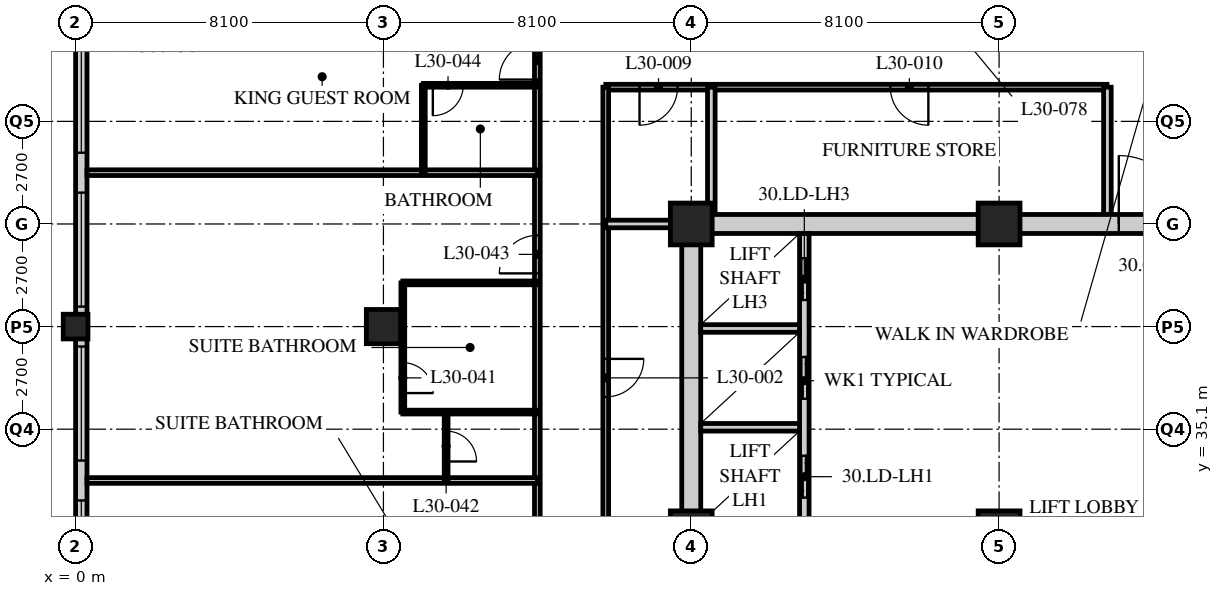
"""IFC4 building model, lengths in metres.
Left out: names, types, materials, properties, quantities, classifications, styles, units other than length and angle.
Written with IfcOpenShell. Run it as: python <this file> out.ifc"""

import sys

from ifc_helpers import new_model, si_unit, direction, frame, frame_2d, origin, origin_2d, place, context, subcontext, project, spatial, rectangle, hollow_rectangle, extrude, element, fill, save


model = new_model("IFC4")
c1 = context("Model", 3, precision=1e-05, world=origin(), true_north=direction((0.0, 1.0)))
c2 = subcontext(c1, "Body", "Model", "MODEL_VIEW")
j1 = project(units=[si_unit("LENGTHUNIT", "METRE"), si_unit("PLANEANGLEUNIT", "RADIAN")], contexts=[c1])
p1 = place(None, origin())
s1 = spatial("IfcSite", under=j1, at=p1, CompositionType="ELEMENT")
p2 = place(p1, origin())
s2 = spatial("IfcBuilding", under=s1, at=p2, CompositionType="ELEMENT")
p3 = place(p2, frame((0.0, 0.0, 120.4)))
s3 = spatial("IfcBuildingStorey", under=s2, at=p3, CompositionType="ELEMENT", Elevation=120.4)
p4 = place(p3, frame((0.0, 37.8, 0.0), z_axis=(0.0, 0.0, 1.0), x_axis=(1.0, 0.0, 0.0)))
e1 = element("IfcColumn", 1, at=p4, inside=s3, PredefinedType="COLUMN", context=c2, shape_type="SweptSolid", body=[
    extrude(hollow_rectangle(XDim=0.65, YDim=0.65, WallThickness=0.055, at=origin_2d()), origin(), (0.0, 0.0, 1.0), 3.4),
])
p5 = place(p3, frame((8.1, 37.8, 0.0), z_axis=(0.0, 0.0, 1.0), x_axis=(1.0, 0.0, 0.0)))
e2 = element("IfcColumn", 2, at=p5, inside=s3, PredefinedType="COLUMN", context=c2, shape_type="SweptSolid", body=[
    extrude(hollow_rectangle(XDim=0.9, YDim=0.9, WallThickness=0.09, at=origin_2d()), origin(), (0.0, 0.0, 1.0), 3.4),
])
for number, where, z_axis, x_axis in (
    (3, (16.2, 32.4, 0.0), (0.0, 0.0, 1.0), (1.0, 0.0, 0.0)),
    (4, (16.2, 40.5, 0.0), (0.0, 0.0, 1.0), (1.0, 0.0, 0.0)),
    (5, (24.3, 32.4, 0.0), (0.0, 0.0, 1.0), (1.0, 0.0, 0.0)),
    (6, (24.3, 40.5, 0.0), (0.0, 0.0, 1.0), (1.0, 0.0, 0.0)),
):
    element("IfcColumn", number, at=place(p3, frame(where, z_axis=z_axis, x_axis=x_axis)), inside=s3, PredefinedType="COLUMN", context=c2, shape_type="SweptSolid", body=[
        extrude(hollow_rectangle(XDim=1.1, YDim=1.1, WallThickness=0.1, at=origin_2d()), origin(), (0.0, 0.0, 1.0), 3.4),
    ])
p6 = place(p3, frame((0.15, 45.6, 0.0), z_axis=(0.0, 0.0, 1.0), x_axis=(0.0, -1.0, 0.0)))
e7 = element("IfcWall", 7, at=p6, inside=s3, PredefinedType="SOLIDWALL", context=c2, shape_type="SweptSolid", body=[
    extrude(rectangle(XDim=32.1, YDim=0.3, at=frame_2d((16.05, 0.0))), origin(), (0.0, 0.0, 1.0), 3.19),
])
p7 = place(p6, frame((0.225, 0.0, 0.9)))
e8 = element("IfcOpeningElement", 8, at=p7, cuts=e7, PredefinedType="OPENING", context=c2, shape_type="SweptSolid", body=[
    extrude(rectangle(XDim=3.0, YDim=2.0, at=frame_2d((1.5, 1.0))), frame((0.0, 0.16, 0.0), z_axis=(0.0, -1.0, 0.0), x_axis=(1.0, 0.0, 0.0)), (0.0, 0.0, 1.0), 0.32),
])
p8 = place(p6, frame((4.275, 0.0, 0.9)))
e9 = element("IfcOpeningElement", 9, at=p8, cuts=e7, PredefinedType="OPENING", context=c2, shape_type="SweptSolid", body=[
    extrude(rectangle(XDim=3.0, YDim=2.0, at=frame_2d((1.5, 1.0))), frame((0.0, 0.16, 0.0), z_axis=(0.0, -1.0, 0.0), x_axis=(1.0, 0.0, 0.0)), (0.0, 0.0, 1.0), 0.32),
])
p9 = place(p6, frame((8.325, 0.0, 0.9)))
e10 = element("IfcOpeningElement", 10, at=p9, cuts=e7, PredefinedType="OPENING", context=c2, shape_type="SweptSolid", body=[
    extrude(rectangle(XDim=3.0, YDim=2.0, at=frame_2d((1.5, 1.0))), frame((0.0, 0.16, 0.0), z_axis=(0.0, -1.0, 0.0), x_axis=(1.0, 0.0, 0.0)), (0.0, 0.0, 1.0), 0.32),
])
p10 = place(p6, frame((12.375, 0.0, 0.9)))
e11 = element("IfcOpeningElement", 11, at=p10, cuts=e7, PredefinedType="OPENING", context=c2, shape_type="SweptSolid", body=[
    extrude(rectangle(XDim=3.0, YDim=2.0, at=frame_2d((1.5, 1.0))), frame((0.0, 0.16, 0.0), z_axis=(0.0, -1.0, 0.0), x_axis=(1.0, 0.0, 0.0)), (0.0, 0.0, 1.0), 0.32),
])
p11 = place(p6, frame((16.425, 0.0, 0.9)))
e12 = element("IfcOpeningElement", 12, at=p11, cuts=e7, PredefinedType="OPENING", context=c2, shape_type="SweptSolid", body=[
    extrude(rectangle(XDim=3.0, YDim=2.0, at=frame_2d((1.5, 1.0))), frame((0.0, 0.16, 0.0), z_axis=(0.0, -1.0, 0.0), x_axis=(1.0, 0.0, 0.0)), (0.0, 0.0, 1.0), 0.32),
])
p12 = place(p6, frame((20.475, 0.0, 0.9)))
e13 = element("IfcOpeningElement", 13, at=p12, cuts=e7, PredefinedType="OPENING", context=c2, shape_type="SweptSolid", body=[
    extrude(rectangle(XDim=3.0, YDim=2.0, at=frame_2d((1.5, 1.0))), frame((0.0, 0.16, 0.0), z_axis=(0.0, -1.0, 0.0), x_axis=(1.0, 0.0, 0.0)), (0.0, 0.0, 1.0), 0.32),
])
p13 = place(p6, frame((24.525, 0.0, 0.9)))
e14 = element("IfcOpeningElement", 14, at=p13, cuts=e7, PredefinedType="OPENING", context=c2, shape_type="SweptSolid", body=[
    extrude(rectangle(XDim=3.0, YDim=2.0, at=frame_2d((1.5, 1.0))), frame((0.0, 0.16, 0.0), z_axis=(0.0, -1.0, 0.0), x_axis=(1.0, 0.0, 0.0)), (0.0, 0.0, 1.0), 0.32),
])
p14 = place(p6, frame((28.575, 0.0, 0.9)))
e15 = element("IfcOpeningElement", 15, at=p14, cuts=e7, PredefinedType="OPENING", context=c2, shape_type="SweptSolid", body=[
    extrude(rectangle(XDim=3.0, YDim=2.0, at=frame_2d((1.5, 1.0))), frame((0.0, 0.16, 0.0), z_axis=(0.0, -1.0, 0.0), x_axis=(1.0, 0.0, 0.0)), (0.0, 0.0, 1.0), 0.32),
])
p15 = place(p3, frame((12.15, 17.55, 0.0), z_axis=(0.0, 0.0, 1.0), x_axis=(0.0, 1.0, 0.0)))
e16 = element("IfcWall", 16, at=p15, inside=s3, PredefinedType="PARTITIONING", context=c2, shape_type="SweptSolid", body=[
    extrude(rectangle(XDim=28.35, YDim=0.15, at=frame_2d((14.175, 0.0))), origin(), (0.0, 0.0, 1.0), 3.19),
])
p16 = place(p15, frame((5.45, 0.0, 0.0)))
e17 = element("IfcOpeningElement", 17, at=p16, cuts=e16, PredefinedType="OPENING", context=c2, shape_type="SweptSolid", body=[
    extrude(rectangle(XDim=1.0, YDim=2.1, at=frame_2d((0.5, 1.05))), frame((0.0, 0.085, 0.0), z_axis=(0.0, -1.0, 0.0), x_axis=(1.0, 0.0, 0.0)), (0.0, 0.0, 1.0), 0.17),
])
p17 = place(p15, frame((13.55, 0.0, 0.0)))
e18 = element("IfcOpeningElement", 18, at=p17, cuts=e16, PredefinedType="OPENING", context=c2, shape_type="SweptSolid", body=[
    extrude(rectangle(XDim=1.0, YDim=2.1, at=frame_2d((0.5, 1.05))), frame((0.0, 0.085, 0.0), z_axis=(0.0, -1.0, 0.0), x_axis=(1.0, 0.0, 0.0)), (0.0, 0.0, 1.0), 0.17),
])
p18 = place(p15, frame((21.65, 0.0, 0.0)))
e19 = element("IfcOpeningElement", 19, at=p18, cuts=e16, PredefinedType="OPENING", context=c2, shape_type="SweptSolid", body=[
    extrude(rectangle(XDim=1.0, YDim=2.1, at=frame_2d((0.5, 1.05))), frame((0.0, 0.085, 0.0), z_axis=(0.0, -1.0, 0.0), x_axis=(1.0, 0.0, 0.0)), (0.0, 0.0, 1.0), 0.17),
])
p19 = place(p15, frame((26.75, 0.0, 0.0)))
e20 = element("IfcOpeningElement", 20, at=p19, cuts=e16, PredefinedType="OPENING", context=c2, shape_type="SweptSolid", body=[
    extrude(rectangle(XDim=1.0, YDim=2.1, at=frame_2d((0.5, 1.05))), frame((0.0, 0.085, 0.0), z_axis=(0.0, -1.0, 0.0), x_axis=(1.0, 0.0, 0.0)), (0.0, 0.0, 1.0), 0.17),
])
p20 = place(p3, frame((27.14, 44.1, 0.0), z_axis=(0.0, 0.0, 1.0), x_axis=(-1.0, 0.0, 0.0)))
e21 = element("IfcWall", 21, at=p20, inside=s3, PredefinedType="PARTITIONING", context=c2, shape_type="SweptSolid", body=[
    extrude(rectangle(XDim=13.19, YDim=0.15, at=frame_2d((6.595, 0.0))), origin(), (0.0, 0.0, 1.0), 3.19),
])
p21 = place(p20, frame((11.301, 0.0, 0.0)))
e22 = element("IfcOpeningElement", 22, at=p21, cuts=e21, PredefinedType="OPENING", context=c2, shape_type="SweptSolid", body=[
    extrude(rectangle(XDim=1.0, YDim=2.1, at=frame_2d((0.5, 1.05))), frame((0.0, 0.085, 0.0), z_axis=(0.0, -1.0, 0.0), x_axis=(1.0, 0.0, 0.0)), (0.0, 0.0, 1.0), 0.17),
])
p22 = place(p20, frame((4.701, 0.0, 0.0)))
e23 = element("IfcOpeningElement", 23, at=p22, cuts=e21, PredefinedType="OPENING", context=c2, shape_type="SweptSolid", body=[
    extrude(rectangle(XDim=1.0, YDim=2.1, at=frame_2d((0.5, 1.05))), frame((0.0, 0.085, 0.0), z_axis=(0.0, -1.0, 0.0), x_axis=(1.0, 0.0, 0.0)), (0.0, 0.0, 1.0), 0.17),
])
p23 = place(p3, frame((13.95, 44.1, 0.0), z_axis=(0.0, 0.0, 1.0), x_axis=(0.0, -1.0, 0.0)))
e24 = element("IfcWall", 24, at=p23, inside=s3, PredefinedType="PARTITIONING", context=c2, shape_type="SweptSolid", body=[
    extrude(rectangle(XDim=24.75, YDim=0.15, at=frame_2d((12.375, 0.0))), origin(), (0.0, 0.0, 1.0), 3.19),
])
p24 = place(p23, frame((15.25, 0.0, 0.0)))
e25 = element("IfcOpeningElement", 25, at=p24, cuts=e24, PredefinedType="OPENING", context=c2, shape_type="SweptSolid", body=[
    extrude(rectangle(XDim=1.0, YDim=2.1, at=frame_2d((0.5, 1.05))), frame((0.0, 0.085, 0.0), z_axis=(0.0, -1.0, 0.0), x_axis=(1.0, 0.0, 0.0)), (0.0, 0.0, 1.0), 0.17),
])
p25 = place(p23, frame((7.15, 0.0, 0.0)))
e26 = element("IfcOpeningElement", 26, at=p25, cuts=e24, PredefinedType="OPENING", context=c2, shape_type="SweptSolid", body=[
    extrude(rectangle(XDim=1.0, YDim=2.1, at=frame_2d((0.5, 1.05))), frame((0.0, 0.085, 0.0), z_axis=(0.0, -1.0, 0.0), x_axis=(1.0, 0.0, 0.0)), (0.0, 0.0, 1.0), 0.17),
])
for number, where, z_axis, x_axis in (
    (27, (16.728, 44.1, 0.0), (0.0, 0.0, 1.0), (0.0, -1.0, 0.0)),
    (28, (27.15, 40.5, 0.0), (0.0, 0.0, 1.0), (0.0, 1.0, 0.0)),
):
    element("IfcWall", number, at=place(p3, frame(where, z_axis=z_axis, x_axis=x_axis)), inside=s3, PredefinedType="SOLIDWALL", context=c2, shape_type="SweptSolid", body=[
        extrude(rectangle(XDim=3.6, YDim=0.2, at=frame_2d((1.8, 0.0))), origin(), (0.0, 0.0, 1.0), 3.19),
    ])
p26 = place(p3, frame((13.95, 40.5, 0.0), z_axis=(0.0, 0.0, 1.0), x_axis=(1.0, 0.0, 0.0)))
e29 = element("IfcWall", 29, at=p26, inside=s3, PredefinedType="SOLIDWALL", context=c2, shape_type="SweptSolid", body=[
    extrude(rectangle(XDim=2.25, YDim=0.2, at=frame_2d((1.125, 0.0))), origin(), (0.0, 0.0, 1.0), 3.19),
])
p27 = place(p3, frame((12.15, 33.75, 0.0), z_axis=(0.0, 0.0, 1.0), x_axis=(-1.0, 0.0, 0.0)))
e30 = element("IfcWall", 30, at=p27, inside=s3, PredefinedType="PARTITIONING", context=c2, shape_type="SweptSolid", body=[
    extrude(rectangle(XDim=11.85, YDim=0.15, at=frame_2d((5.925, 0.0))), origin(), (0.0, 0.0, 1.0), 3.19),
])
p28 = place(p3, frame((8.61, 35.55, 0.0), z_axis=(0.0, 0.0, 1.0), x_axis=(0.0, 1.0, 0.0)))
e31 = element("IfcWall", 31, at=p28, inside=s3, PredefinedType="PARTITIONING", context=c2, shape_type="SweptSolid", body=[
    extrude(rectangle(XDim=3.4, YDim=0.1, at=frame_2d((1.7, 0.0))), origin(), (0.0, 0.0, 1.0), 3.19),
])
p29 = place(p28, frame((0.5, 0.0, 0.0)))
e32 = element("IfcOpeningElement", 32, at=p29, cuts=e31, PredefinedType="OPENING", context=c2, shape_type="SweptSolid", body=[
    extrude(rectangle(XDim=0.8, YDim=2.1, at=frame_2d((0.4, 1.05))), frame((0.0, 0.06, 0.0), z_axis=(0.0, -1.0, 0.0), x_axis=(1.0, 0.0, 0.0)), (0.0, 0.0, 1.0), 0.12),
])
p30 = place(p3, frame((9.75, 33.75, 0.0), z_axis=(0.0, 0.0, 1.0), x_axis=(0.0, 1.0, 0.0)))
e33 = element("IfcWall", 33, at=p30, inside=s3, PredefinedType="PARTITIONING", context=c2, shape_type="SweptSolid", body=[
    extrude(rectangle(XDim=1.8, YDim=0.1, at=frame_2d((0.9, 0.0))), origin(), (0.0, 0.0, 1.0), 3.19),
])
p31 = place(p30, frame((0.5, 0.0, 0.0)))
e34 = element("IfcOpeningElement", 34, at=p31, cuts=e33, PredefinedType="OPENING", context=c2, shape_type="SweptSolid", body=[
    extrude(rectangle(XDim=0.8, YDim=2.1, at=frame_2d((0.4, 1.05))), frame((0.0, 0.06, 0.0), z_axis=(0.0, -1.0, 0.0), x_axis=(1.0, 0.0, 0.0)), (0.0, 0.0, 1.0), 0.12),
])
for number, where, z_axis, x_axis in (
    (35, (12.15, 35.55, 0.0), (0.0, 0.0, 1.0), (-1.0, 0.0, 0.0)),
    (36, (12.15, 38.95, 0.0), (0.0, 0.0, 1.0), (-1.0, 0.0, 0.0)),
):
    element("IfcWall", number, at=place(p3, frame(where, z_axis=z_axis, x_axis=x_axis)), inside=s3, PredefinedType="PARTITIONING", context=c2, shape_type="SweptSolid", body=[
        extrude(rectangle(XDim=3.54, YDim=0.1, at=frame_2d((1.77, 0.0))), origin(), (0.0, 0.0, 1.0), 3.19),
    ])
p32 = place(p3, frame((12.15, 41.85, 0.0), z_axis=(0.0, 0.0, 1.0), x_axis=(-1.0, 0.0, 0.0)))
e37 = element("IfcWall", 37, at=p32, inside=s3, PredefinedType="PARTITIONING", context=c2, shape_type="SweptSolid", body=[
    extrude(rectangle(XDim=11.85, YDim=0.15, at=frame_2d((5.925, 0.0))), origin(), (0.0, 0.0, 1.0), 3.19),
])
p33 = place(p3, frame((9.15, 41.85, 0.0), z_axis=(0.0, 0.0, 1.0), x_axis=(0.0, 1.0, 0.0)))
e38 = element("IfcWall", 38, at=p33, inside=s3, PredefinedType="PARTITIONING", context=c2, shape_type="SweptSolid", body=[
    extrude(rectangle(XDim=2.3, YDim=0.1, at=frame_2d((1.15, 0.0))), origin(), (0.0, 0.0, 1.0), 3.19),
])
p34 = place(p3, frame((12.15, 44.15, 0.0), z_axis=(0.0, 0.0, 1.0), x_axis=(-1.0, 0.0, 0.0)))
e39 = element("IfcWall", 39, at=p34, inside=s3, PredefinedType="PARTITIONING", context=c2, shape_type="SweptSolid", body=[
    extrude(rectangle(XDim=3.0, YDim=0.1, at=frame_2d((1.5, 0.0))), origin(), (0.0, 0.0, 1.0), 3.19),
])
p35 = place(p34, frame((1.95, 0.0, 0.0)))
e40 = element("IfcOpeningElement", 40, at=p35, cuts=e39, PredefinedType="OPENING", context=c2, shape_type="SweptSolid", body=[
    extrude(rectangle(XDim=0.8, YDim=2.1, at=frame_2d((0.4, 1.05))), frame((0.0, 0.06, 0.0), z_axis=(0.0, -1.0, 0.0), x_axis=(1.0, 0.0, 0.0)), (0.0, 0.0, 1.0), 0.12),
])
p36 = place(p3, frame((15.95, 40.5, 0.0), z_axis=(0.0, 0.0, 1.0), x_axis=(1.0, 0.0, 0.0)))
e41 = element("IfcWall", 41, at=p36, inside=s3, PredefinedType="SOLIDWALL", context=c2, shape_type="SweptSolid", body=[
    extrude(rectangle(XDim=24.8, YDim=0.5, at=frame_2d((12.4, 0.0))), origin(), (0.0, 0.0, 1.0), 2.54),
])
p37 = place(p36, frame((11.5, 0.0, 0.0)))
e42 = element("IfcOpeningElement", 42, at=p37, cuts=e41, PredefinedType="OPENING", context=c2, shape_type="SweptSolid", body=[
    extrude(rectangle(XDim=1.8, YDim=2.4, at=frame_2d((0.9, 1.2))), frame((0.0, 0.26, 0.0), z_axis=(0.0, -1.0, 0.0), x_axis=(1.0, 0.0, 0.0)), (0.0, 0.0, 1.0), 0.52),
])
p38 = place(p3, frame((16.2, 24.55, 0.0), z_axis=(0.0, 0.0, 1.0), x_axis=(0.0, 1.0, 0.0)))
e43 = element("IfcWall", 43, at=p38, inside=s3, PredefinedType="SOLIDWALL", context=c2, shape_type="SweptSolid", body=[
    extrude(rectangle(XDim=15.7, YDim=0.5, at=frame_2d((7.85, 0.0))), origin(), (0.0, 0.0, 1.0), 2.578),
])
p39 = place(p3, frame((19.175, 32.5, 0.0), z_axis=(0.0, 0.0, 1.0), x_axis=(0.0, 1.0, 0.0)))
e44 = element("IfcWall", 44, at=p39, inside=s3, PredefinedType="SOLIDWALL", context=c2, shape_type="SweptSolid", body=[
    extrude(rectangle(XDim=7.75, YDim=0.25, at=frame_2d((3.875, 0.0))), origin(), (0.0, 0.0, 1.0), 3.19),
])
p40 = place(p39, frame((0.8, 0.0, 0.0)))
e45 = element("IfcOpeningElement", 45, at=p40, cuts=e44, PredefinedType="OPENING", context=c2, shape_type="SweptSolid", body=[
    extrude(rectangle(XDim=1.1, YDim=2.4, at=frame_2d((0.55, 1.2))), frame((0.0, 0.135, 0.0), z_axis=(0.0, -1.0, 0.0), x_axis=(1.0, 0.0, 0.0)), (0.0, 0.0, 1.0), 0.27),
])
p41 = place(p39, frame((3.4, 0.0, 0.0)))
e46 = element("IfcOpeningElement", 46, at=p41, cuts=e44, PredefinedType="OPENING", context=c2, shape_type="SweptSolid", body=[
    extrude(rectangle(XDim=1.1, YDim=2.4, at=frame_2d((0.55, 1.2))), frame((0.0, 0.135, 0.0), z_axis=(0.0, -1.0, 0.0), x_axis=(1.0, 0.0, 0.0)), (0.0, 0.0, 1.0), 0.27),
])
p42 = place(p39, frame((6.0, 0.0, 0.0)))
e47 = element("IfcOpeningElement", 47, at=p42, cuts=e44, PredefinedType="OPENING", context=c2, shape_type="SweptSolid", body=[
    extrude(rectangle(XDim=1.1, YDim=2.4, at=frame_2d((0.55, 1.2))), frame((0.0, 0.135, 0.0), z_axis=(0.0, -1.0, 0.0), x_axis=(1.0, 0.0, 0.0)), (0.0, 0.0, 1.0), 0.27),
])
for number, where, z_axis, x_axis in (
    (48, (16.45, 35.15, 0.0), (0.0, 0.0, 1.0), (1.0, 0.0, 0.0)),
    (49, (16.45, 37.75, 0.0), (0.0, 0.0, 1.0), (1.0, 0.0, 0.0)),
):
    element("IfcWall", number, at=place(p3, frame(where, z_axis=z_axis, x_axis=x_axis)), inside=s3, PredefinedType="SOLIDWALL", context=c2, shape_type="SweptSolid", body=[
        extrude(rectangle(XDim=2.6, YDim=0.2, at=frame_2d((1.3, 0.0))), origin(), (0.0, 0.0, 1.0), 3.19),
    ])
p43 = place(p7, origin())
e50 = element("IfcWindow", 50, at=p43, inside=s3, PartitioningType="SINGLE_PANEL", PredefinedType="WINDOW", context=c2, shape_type="SweptSolid", body=[
    extrude(rectangle(XDim=3.0, YDim=2.0, at=frame_2d((1.5, 1.0))), frame((0.0, 0.03, 0.0), z_axis=(0.0, -1.0, 0.0), x_axis=(1.0, 0.0, 0.0)), (0.0, 0.0, 1.0), 0.06),
])
fill(e8, e50)
p44 = place(p8, origin())
e51 = element("IfcWindow", 51, at=p44, inside=s3, PartitioningType="SINGLE_PANEL", PredefinedType="WINDOW", context=c2, shape_type="SweptSolid", body=[
    extrude(rectangle(XDim=3.0, YDim=2.0, at=frame_2d((1.5, 1.0))), frame((0.0, 0.03, 0.0), z_axis=(0.0, -1.0, 0.0), x_axis=(1.0, 0.0, 0.0)), (0.0, 0.0, 1.0), 0.06),
])
fill(e9, e51)
p45 = place(p9, origin())
e52 = element("IfcWindow", 52, at=p45, inside=s3, PartitioningType="SINGLE_PANEL", PredefinedType="WINDOW", context=c2, shape_type="SweptSolid", body=[
    extrude(rectangle(XDim=3.0, YDim=2.0, at=frame_2d((1.5, 1.0))), frame((0.0, 0.03, 0.0), z_axis=(0.0, -1.0, 0.0), x_axis=(1.0, 0.0, 0.0)), (0.0, 0.0, 1.0), 0.06),
])
fill(e10, e52)
p46 = place(p10, origin())
e53 = element("IfcWindow", 53, at=p46, inside=s3, PartitioningType="SINGLE_PANEL", PredefinedType="WINDOW", context=c2, shape_type="SweptSolid", body=[
    extrude(rectangle(XDim=3.0, YDim=2.0, at=frame_2d((1.5, 1.0))), frame((0.0, 0.03, 0.0), z_axis=(0.0, -1.0, 0.0), x_axis=(1.0, 0.0, 0.0)), (0.0, 0.0, 1.0), 0.06),
])
fill(e11, e53)
p47 = place(p25, origin())
e54 = element("IfcDoor", 54, at=p47, inside=s3, OperationType="SINGLE_SWING_LEFT", PredefinedType="DOOR", context=c2, shape_type="SweptSolid", body=[
    extrude(rectangle(XDim=1.0, YDim=2.1, at=frame_2d((0.5, 1.05))), frame((0.0, 0.025, 0.0), z_axis=(0.0, -1.0, 0.0), x_axis=(1.0, 0.0, 0.0)), (0.0, 0.0, 1.0), 0.05),
])
fill(e26, e54)
p48 = place(p21, origin())
e55 = element("IfcDoor", 55, at=p48, inside=s3, OperationType="SINGLE_SWING_RIGHT", PredefinedType="DOOR", context=c2, shape_type="SweptSolid", body=[
    extrude(rectangle(XDim=1.0, YDim=2.1, at=frame_2d((0.5, 1.05))), frame((0.0, 0.025, 0.0), z_axis=(0.0, -1.0, 0.0), x_axis=(1.0, 0.0, 0.0)), (0.0, 0.0, 1.0), 0.05),
])
fill(e22, e55)
p49 = place(p22, origin())
e56 = element("IfcDoor", 56, at=p49, inside=s3, OperationType="SINGLE_SWING_LEFT", PredefinedType="DOOR", context=c2, shape_type="SweptSolid", body=[
    extrude(rectangle(XDim=1.0, YDim=2.1, at=frame_2d((0.5, 1.05))), frame((0.0, 0.025, 0.0), z_axis=(0.0, -1.0, 0.0), x_axis=(1.0, 0.0, 0.0)), (0.0, 0.0, 1.0), 0.05),
])
fill(e23, e56)
p50 = place(p29, origin())
e57 = element("IfcDoor", 57, at=p50, inside=s3, OperationType="SINGLE_SWING_RIGHT", PredefinedType="DOOR", context=c2, shape_type="SweptSolid", body=[
    extrude(rectangle(XDim=0.8, YDim=2.1, at=frame_2d((0.4, 1.05))), frame((0.0, 0.025, 0.0), z_axis=(0.0, -1.0, 0.0), x_axis=(1.0, 0.0, 0.0)), (0.0, 0.0, 1.0), 0.05),
])
fill(e32, e57)
p51 = place(p31, origin())
e58 = element("IfcDoor", 58, at=p51, inside=s3, OperationType="SINGLE_SWING_RIGHT", PredefinedType="DOOR", context=c2, shape_type="SweptSolid", body=[
    extrude(rectangle(XDim=0.8, YDim=2.1, at=frame_2d((0.4, 1.05))), frame((0.0, 0.025, 0.0), z_axis=(0.0, -1.0, 0.0), x_axis=(1.0, 0.0, 0.0)), (0.0, 0.0, 1.0), 0.05),
])
fill(e34, e58)
p52 = place(p18, origin())
e59 = element("IfcDoor", 59, at=p52, inside=s3, OperationType="SINGLE_SWING_LEFT", PredefinedType="DOOR", context=c2, shape_type="SweptSolid", body=[
    extrude(rectangle(XDim=1.0, YDim=2.1, at=frame_2d((0.5, 1.05))), frame((0.0, 0.025, 0.0), z_axis=(0.0, -1.0, 0.0), x_axis=(1.0, 0.0, 0.0)), (0.0, 0.0, 1.0), 0.05),
])
fill(e19, e59)
p53 = place(p35, origin())
e60 = element("IfcDoor", 60, at=p53, inside=s3, OperationType="SINGLE_SWING_RIGHT", PredefinedType="DOOR", context=c2, shape_type="SweptSolid", body=[
    extrude(rectangle(XDim=0.8, YDim=2.1, at=frame_2d((0.4, 1.05))), frame((0.0, 0.025, 0.0), z_axis=(0.0, -1.0, 0.0), x_axis=(1.0, 0.0, 0.0)), (0.0, 0.0, 1.0), 0.05),
])
fill(e40, e60)
p54 = place(p19, origin())
e61 = element("IfcDoor", 61, at=p54, inside=s3, OperationType="SINGLE_SWING_LEFT", PredefinedType="DOOR", context=c2, shape_type="SweptSolid", body=[
    extrude(rectangle(XDim=1.0, YDim=2.1, at=frame_2d((0.5, 1.05))), frame((0.0, 0.025, 0.0), z_axis=(0.0, -1.0, 0.0), x_axis=(1.0, 0.0, 0.0)), (0.0, 0.0, 1.0), 0.05),
])
fill(e20, e61)
p55 = place(p40, origin())
e62 = element("IfcDoor", 62, at=p55, inside=s3, OperationType="DOUBLE_DOOR_SLIDING", PredefinedType="DOOR", context=c2, shape_type="SweptSolid", body=[
    extrude(rectangle(XDim=1.1, YDim=2.4, at=frame_2d((0.55, 1.2))), frame((0.0, 0.025, 0.0), z_axis=(0.0, -1.0, 0.0), x_axis=(1.0, 0.0, 0.0)), (0.0, 0.0, 1.0), 0.05),
])
fill(e45, e62)
p56 = place(p41, origin())
e63 = element("IfcDoor", 63, at=p56, inside=s3, OperationType="DOUBLE_DOOR_SLIDING", PredefinedType="DOOR", context=c2, shape_type="SweptSolid", body=[
    extrude(rectangle(XDim=1.1, YDim=2.4, at=frame_2d((0.55, 1.2))), frame((0.0, 0.025, 0.0), z_axis=(0.0, -1.0, 0.0), x_axis=(1.0, 0.0, 0.0)), (0.0, 0.0, 1.0), 0.05),
])
fill(e46, e63)
p57 = place(p42, origin())
e64 = element("IfcDoor", 64, at=p57, inside=s3, OperationType="DOUBLE_DOOR_SLIDING", PredefinedType="DOOR", context=c2, shape_type="SweptSolid", body=[
    extrude(rectangle(XDim=1.1, YDim=2.4, at=frame_2d((0.55, 1.2))), frame((0.0, 0.025, 0.0), z_axis=(0.0, -1.0, 0.0), x_axis=(1.0, 0.0, 0.0)), (0.0, 0.0, 1.0), 0.05),
])
fill(e47, e64)
p58 = place(p37, origin())
e65 = element("IfcDoor", 65, at=p58, inside=s3, OperationType="DOUBLE_DOOR_SINGLE_SWING", PredefinedType="DOOR", context=c2, shape_type="SweptSolid", body=[
    extrude(rectangle(XDim=1.8, YDim=2.4, at=frame_2d((0.9, 1.2))), frame((0.0, 0.025, 0.0), z_axis=(0.0, -1.0, 0.0), x_axis=(1.0, 0.0, 0.0)), (0.0, 0.0, 1.0), 0.05),
])
fill(e42, e65)
save(model, sys.argv[1])
